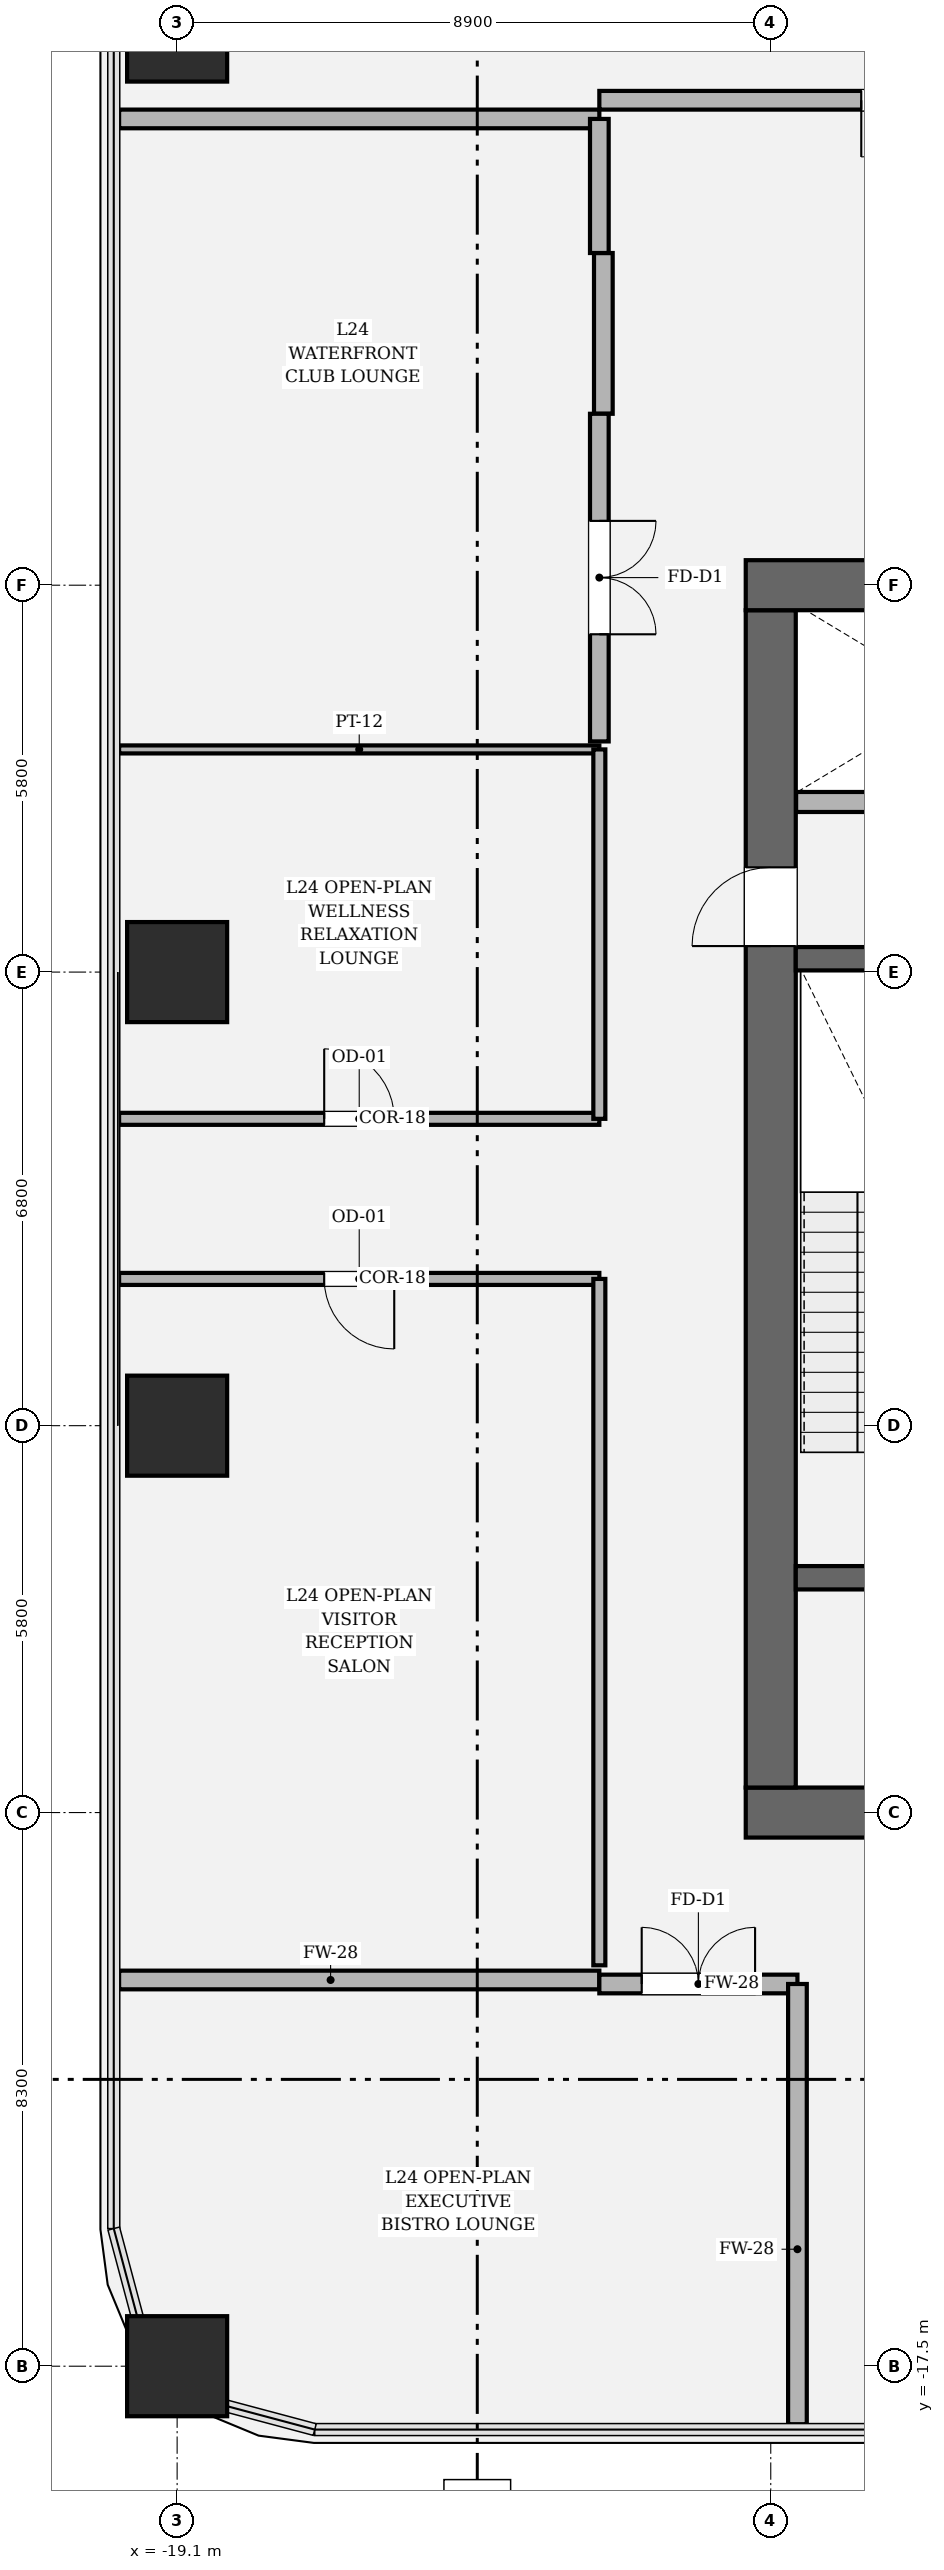
"""IFC4 building model, lengths in metres.
Left out: names, types, materials, properties, quantities, classifications, styles, units other than length and angle.
Written with IfcOpenShell. Run it as: python <this file> out.ifc"""

import sys

from ifc_helpers import new_model, si_unit, direction, frame, frame_2d, origin, origin_2d, place, context, subcontext, project, spatial, rectangle, hollow_rectangle, extrude, element, fill, save


model = new_model("IFC4")
c1 = context("Model", 3, precision=1e-05, world=origin(), true_north=direction((0.0, 1.0)))
c2 = subcontext(c1, "Body", "Model", "MODEL_VIEW")
j1 = project(units=[si_unit("LENGTHUNIT", "METRE"), si_unit("PLANEANGLEUNIT", "RADIAN")], contexts=[c1])
p1 = place(None, origin())
s1 = spatial("IfcSite", under=j1, at=p1, CompositionType="ELEMENT")
p2 = place(p1, origin())
s2 = spatial("IfcBuilding", under=s1, at=p2, CompositionType="ELEMENT")
p3 = place(p2, frame((0.0, 0.0, 105.15)))
s3 = spatial("IfcBuildingStorey", under=s2, at=p3, CompositionType="ELEMENT", Elevation=105.15)
p4 = place(p3, frame((10.575, -9.2, 0.0), z_axis=(0.0, 0.0, 1.0), x_axis=(-1.0, 0.0, 0.0)))
e1 = element("IfcWall", 1, at=p4, inside=s3, PredefinedType="SHEAR", context=c2, shape_type="SweptSolid", body=[
    extrude(rectangle(XDim=21.15, YDim=0.75, at=frame_2d((10.575, 0.0))), origin(), (0.0, 0.0, 1.0), 4.05),
])
p5 = place(p4, frame((2.85, 0.0, 0.0)))
e2 = element("IfcOpeningElement", 2, at=p5, cuts=e1, PredefinedType="OPENING", context=c2, shape_type="SweptSolid", body=[
    extrude(rectangle(XDim=1.25, YDim=2.25, at=frame_2d((0.625, 1.125))), frame((0.0, 0.385, 0.0), z_axis=(0.0, -1.0, 0.0), x_axis=(1.0, 0.0, 0.0)), (0.0, 0.0, 1.0), 0.77),
])
p6 = place(p4, frame((17.05, 0.0, 0.0)))
e3 = element("IfcOpeningElement", 3, at=p6, cuts=e1, PredefinedType="OPENING", context=c2, shape_type="SweptSolid", body=[
    extrude(rectangle(XDim=1.25, YDim=2.25, at=frame_2d((0.625, 1.125))), frame((0.0, 0.385, 0.0), z_axis=(0.0, -1.0, 0.0), x_axis=(1.0, 0.0, 0.0)), (0.0, 0.0, 1.0), 0.77),
])
p7 = place(p3, frame((-10.2, -8.825, 0.0), z_axis=(0.0, 0.0, 1.0), x_axis=(0.0, 1.0, 0.0)))
e4 = element("IfcWall", 4, at=p7, inside=s3, PredefinedType="SHEAR", context=c2, shape_type="SweptSolid", body=[
    extrude(rectangle(XDim=17.65, YDim=0.75, at=frame_2d((8.825, 0.0))), origin(), (0.0, 0.0, 1.0), 4.05),
])
p8 = place(p7, frame((12.615, 0.0, 0.0)))
e5 = element("IfcOpeningElement", 5, at=p8, cuts=e4, PredefinedType="OPENING", context=c2, shape_type="SweptSolid", body=[
    extrude(rectangle(XDim=1.18, YDim=2.2, at=frame_2d((0.59, 1.1))), frame((0.0, 0.385, 0.0), z_axis=(0.0, -1.0, 0.0), x_axis=(1.0, 0.0, 0.0)), (0.0, 0.0, 1.0), 0.77),
])
p9 = place(p3, frame((-10.575, 9.2, 0.0), z_axis=(0.0, 0.0, 1.0), x_axis=(1.0, 0.0, 0.0)))
e6 = element("IfcWall", 6, at=p9, inside=s3, PredefinedType="SHEAR", context=c2, shape_type="SweptSolid", body=[
    extrude(rectangle(XDim=21.15, YDim=0.75, at=frame_2d((10.575, 0.0))), origin(), (0.0, 0.0, 1.0), 4.05),
])
p10 = place(p3, frame((-9.825, -5.68, 0.0), z_axis=(0.0, 0.0, 1.0), x_axis=(1.0, 0.0, 0.0)))
e7 = element("IfcWall", 7, at=p10, inside=s3, PredefinedType="SOLIDWALL", context=c2, shape_type="SweptSolid", body=[
    extrude(rectangle(XDim=5.175, YDim=0.35, at=frame_2d((2.587, 0.0))), origin(), (0.0, 0.0, 1.0), 4.05),
])
p11 = place(p10, frame((1.285, 0.0, 0.0)))
e8 = element("IfcOpeningElement", 8, at=p11, cuts=e7, PredefinedType="OPENING", context=c2, shape_type="SweptSolid", body=[
    extrude(rectangle(XDim=1.18, YDim=2.2, at=frame_2d((0.59, 1.1))), frame((0.0, 0.185, 0.0), z_axis=(0.0, -1.0, 0.0), x_axis=(1.0, 0.0, 0.0)), (0.0, 0.0, 1.0), 0.37),
])
p12 = place(p3, frame((-9.825, 3.6, 0.0), z_axis=(0.0, 0.0, 1.0), x_axis=(1.0, 0.0, 0.0)))
e9 = element("IfcWall", 9, at=p12, inside=s3, PredefinedType="SOLIDWALL", context=c2, shape_type="SweptSolid", body=[
    extrude(rectangle(XDim=5.175, YDim=0.35, at=frame_2d((2.587, 0.0))), origin(), (0.0, 0.0, 1.0), 4.05),
])
for number, where, z_axis, x_axis in (
    (10, (-19.1, -17.5, 0.0), (0.0, 0.0, 1.0), (1.0, 0.0, 0.0)),
    (11, (-19.1, 17.5, 0.0), (0.0, 0.0, 1.0), (1.0, 0.0, 0.0)),
    (12, (-19.1, 3.4, 0.0), (0.0, 0.0, 1.0), (1.0, 0.0, 0.0)),
    (13, (-19.1, -3.4, 0.0), (0.0, 0.0, 1.0), (1.0, 0.0, 0.0)),
):
    element("IfcColumn", number, at=place(p3, frame(where, z_axis=z_axis, x_axis=x_axis)), inside=s3, PredefinedType="COLUMN", context=c2, shape_type="SweptSolid", body=[
        extrude(hollow_rectangle(XDim=1.5, YDim=1.5, WallThickness=0.045, at=origin_2d()), origin(), (0.0, 0.0, 1.0), 4.05),
    ])
p13 = place(p3, frame((-9.82, 5.95, 0.0), z_axis=(0.0, 0.0, 1.0), x_axis=(1.0, 0.0, 0.0)))
e14 = element("IfcWall", 14, at=p13, inside=s3, PredefinedType="SOLIDWALL", context=c2, shape_type="SweptSolid", body=[
    extrude(rectangle(XDim=4.76, YDim=0.3, at=frame_2d((2.38, 0.0))), origin(), (0.0, 0.0, 1.0), 3.81),
])
p14 = place(p3, frame((-19.97, -11.71, 0.0), z_axis=(0.0, 0.0, 1.0), x_axis=(1.0, 0.0, 0.0)))
e15 = element("IfcWall", 15, at=p14, inside=s3, PredefinedType="SOLIDWALL", context=c2, shape_type="SweptSolid", body=[
    extrude(rectangle(XDim=7.2, YDim=0.28, at=frame_2d((3.6, 0.0))), origin(), (0.0, 0.0, 1.0), 2.484),
])
p15 = place(p3, frame((-12.77, -11.77, 0.0), z_axis=(0.0, 0.0, 1.0), x_axis=(1.0, 0.0, 0.0)))
e16 = element("IfcWall", 16, at=p15, inside=s3, PredefinedType="SOLIDWALL", context=c2, shape_type="SweptSolid", body=[
    extrude(rectangle(XDim=2.97, YDim=0.28, at=frame_2d((1.485, 0.0))), origin(), (0.0, 0.0, 1.0), 2.484),
])
p16 = place(p15, frame((0.635, 0.0, 0.0)))
e17 = element("IfcOpeningElement", 17, at=p16, cuts=e16, PredefinedType="OPENING", context=c2, shape_type="SweptSolid", body=[
    extrude(rectangle(XDim=1.7, YDim=2.3, at=frame_2d((0.85, 1.15))), frame((0.0, 0.15, 0.0), z_axis=(0.0, -1.0, 0.0), x_axis=(1.0, 0.0, 0.0)), (0.0, 0.0, 1.0), 0.3),
])
p17 = place(p3, frame((-9.8, -11.77, 0.0), z_axis=(0.0, 0.0, 1.0), x_axis=(0.0, -1.0, 0.0)))
e18 = element("IfcWall", 18, at=p17, inside=s3, PredefinedType="SOLIDWALL", context=c2, shape_type="SweptSolid", body=[
    extrude(rectangle(XDim=6.6, YDim=0.28, at=frame_2d((3.3, 0.0))), origin(), (0.0, 0.0, 1.0), 2.484),
])
p18 = place(p3, frame((-19.97, -1.2, 0.0), z_axis=(0.0, 0.0, 1.0), x_axis=(1.0, 0.0, 0.0)))
e19 = element("IfcWall", 19, at=p18, inside=s3, PredefinedType="PARTITIONING", context=c2, shape_type="SweptSolid", body=[
    extrude(rectangle(XDim=7.2, YDim=0.18, at=frame_2d((3.6, 0.0))), origin(), (0.0, 0.0, 1.0), 2.484),
])
p19 = place(p18, frame((3.075, 0.0, 0.0)))
e20 = element("IfcOpeningElement", 20, at=p19, cuts=e19, PredefinedType="OPENING", context=c2, shape_type="SweptSolid", body=[
    extrude(rectangle(XDim=1.05, YDim=2.2, at=frame_2d((0.525, 1.1))), frame((0.0, 0.1, 0.0), z_axis=(0.0, -1.0, 0.0), x_axis=(1.0, 0.0, 0.0)), (0.0, 0.0, 1.0), 0.2),
])
p20 = place(p3, frame((-12.77, -1.2, 0.0), z_axis=(0.0, 0.0, 1.0), x_axis=(0.0, -1.0, 0.0)))
e21 = element("IfcWall", 21, at=p20, inside=s3, PredefinedType="PARTITIONING", context=c2, shape_type="SweptSolid", body=[
    extrude(rectangle(XDim=10.29, YDim=0.18, at=frame_2d((5.145, 0.0))), origin(), (0.0, 0.0, 1.0), 2.484),
])
p21 = place(p3, frame((-12.77, 1.2, 0.0), z_axis=(0.0, 0.0, 1.0), x_axis=(-1.0, 0.0, 0.0)))
e22 = element("IfcWall", 22, at=p21, inside=s3, PredefinedType="PARTITIONING", context=c2, shape_type="SweptSolid", body=[
    extrude(rectangle(XDim=7.2, YDim=0.18, at=frame_2d((3.6, 0.0))), origin(), (0.0, 0.0, 1.0), 2.484),
])
p22 = place(p21, frame((3.075, 0.0, 0.0)))
e23 = element("IfcOpeningElement", 23, at=p22, cuts=e22, PredefinedType="OPENING", context=c2, shape_type="SweptSolid", body=[
    extrude(rectangle(XDim=1.05, YDim=2.2, at=frame_2d((0.525, 1.1))), frame((0.0, 0.1, 0.0), z_axis=(0.0, -1.0, 0.0), x_axis=(1.0, 0.0, 0.0)), (0.0, 0.0, 1.0), 0.2),
])
p23 = place(p3, frame((-19.97, 6.738, 0.0), z_axis=(0.0, 0.0, 1.0), x_axis=(1.0, 0.0, 0.0)))
e24 = element("IfcWall", 24, at=p23, inside=s3, PredefinedType="PARTITIONING", context=c2, shape_type="SweptSolid", body=[
    extrude(rectangle(XDim=7.2, YDim=0.12, at=frame_2d((3.6, 0.0))), origin(), (0.0, 0.0, 1.0), 2.484),
])
p24 = place(p3, frame((-12.77, 6.738, 0.0), z_axis=(0.0, 0.0, 1.0), x_axis=(0.0, -1.0, 0.0)))
e25 = element("IfcWall", 25, at=p24, inside=s3, PredefinedType="PARTITIONING", context=c2, shape_type="SweptSolid", body=[
    extrude(rectangle(XDim=5.538, YDim=0.18, at=frame_2d((2.769, 0.0))), origin(), (0.0, 0.0, 1.0), 2.484),
])
p25 = place(p3, frame((-12.71, 14.18, 0.0), z_axis=(0.0, 0.0, 1.0), x_axis=(0.0, -1.0, 0.0)))
e26 = element("IfcWall", 26, at=p25, inside=s3, PredefinedType="SOLIDWALL", context=c2, shape_type="SweptSolid", body=[
    extrude(rectangle(XDim=2.41, YDim=0.28, at=frame_2d((1.205, 0.0))), origin(), (0.0, 0.0, 1.0), 3.354),
])
p26 = place(p3, frame((-12.77, 11.77, 0.0), z_axis=(0.0, 0.0, 1.0), x_axis=(0.0, -1.0, 0.0)))
e27 = element("IfcWall", 27, at=p26, inside=s3, PredefinedType="SOLIDWALL", context=c2, shape_type="SweptSolid", body=[
    extrude(rectangle(XDim=4.912, YDim=0.28, at=frame_2d((2.456, 0.0))), origin(), (0.0, 0.0, 1.0), 2.484),
])
p27 = place(p26, frame((1.606, 0.0, 0.0)))
e28 = element("IfcOpeningElement", 28, at=p27, cuts=e27, PredefinedType="OPENING", context=c2, shape_type="SweptSolid", body=[
    extrude(rectangle(XDim=1.7, YDim=2.3, at=frame_2d((0.85, 1.15))), frame((0.0, 0.15, 0.0), z_axis=(0.0, -1.0, 0.0), x_axis=(1.0, 0.0, 0.0)), (0.0, 0.0, 1.0), 0.3),
])
p28 = place(p3, frame((-19.97, 16.19, 0.0), z_axis=(0.0, 0.0, 1.0), x_axis=(1.0, 0.0, 0.0)))
e29 = element("IfcWall", 29, at=p28, inside=s3, PredefinedType="SOLIDWALL", context=c2, shape_type="SweptSolid", body=[
    extrude(rectangle(XDim=7.2, YDim=0.28, at=frame_2d((3.6, 0.0))), origin(), (0.0, 0.0, 1.0), 2.484),
])
p29 = place(p3, frame((-12.77, 16.19, 0.0), z_axis=(0.0, 0.0, 1.0), x_axis=(0.0, -1.0, 0.0)))
e30 = element("IfcWall", 30, at=p29, inside=s3, PredefinedType="SOLIDWALL", context=c2, shape_type="SweptSolid", body=[
    extrude(rectangle(XDim=2.01, YDim=0.28, at=frame_2d((1.005, 0.0))), origin(), (0.0, 0.0, 1.0), 3.81),
])
p30 = place(p3, frame((-3.216, 16.47, 0.0), z_axis=(0.0, 0.0, 1.0), x_axis=(-1.0, 0.0, 0.0)))
e31 = element("IfcWall", 31, at=p30, inside=s3, PredefinedType="SOLIDWALL", context=c2, shape_type="SweptSolid", body=[
    extrude(rectangle(XDim=9.554, YDim=0.28, at=frame_2d((4.777, 0.0))), origin(), (0.0, 0.0, 1.0), 2.484),
])
p31 = place(p30, frame((3.927, 0.0, 0.0)))
e32 = element("IfcOpeningElement", 32, at=p31, cuts=e31, PredefinedType="OPENING", context=c2, shape_type="SweptSolid", body=[
    extrude(rectangle(XDim=1.7, YDim=2.3, at=frame_2d((0.85, 1.15))), frame((0.0, 0.15, 0.0), z_axis=(0.0, -1.0, 0.0), x_axis=(1.0, 0.0, 0.0)), (0.0, 0.0, 1.0), 0.3),
])
p32 = place(p8, origin())
e33 = element("IfcDoor", 33, at=p32, inside=s3, OperationType="SINGLE_SWING_LEFT", PredefinedType="DOOR", context=c2, shape_type="SweptSolid", body=[
    extrude(rectangle(XDim=1.18, YDim=2.2, at=frame_2d((0.59, 1.1))), frame((0.0, 0.025, 0.0), z_axis=(0.0, -1.0, 0.0), x_axis=(1.0, 0.0, 0.0)), (0.0, 0.0, 1.0), 0.05),
])
fill(e5, e33)
p33 = place(p16, origin())
e34 = element("IfcDoor", 34, at=p33, inside=s3, OperationType="DOUBLE_DOOR_SINGLE_SWING", PredefinedType="DOOR", context=c2, shape_type="SweptSolid", body=[
    extrude(rectangle(XDim=1.7, YDim=2.3, at=frame_2d((0.85, 1.15))), frame((0.0, 0.025, 0.0), z_axis=(0.0, -1.0, 0.0), x_axis=(1.0, 0.0, 0.0)), (0.0, 0.0, 1.0), 0.05),
])
fill(e17, e34)
p34 = place(p19, origin())
e35 = element("IfcDoor", 35, at=p34, inside=s3, OperationType="SINGLE_SWING_RIGHT", PredefinedType="DOOR", context=c2, shape_type="SweptSolid", body=[
    extrude(rectangle(XDim=1.05, YDim=2.2, at=frame_2d((0.525, 1.1))), frame((0.0, 0.025, 0.0), z_axis=(0.0, -1.0, 0.0), x_axis=(1.0, 0.0, 0.0)), (0.0, 0.0, 1.0), 0.05),
])
fill(e20, e35)
p35 = place(p22, origin())
e36 = element("IfcDoor", 36, at=p35, inside=s3, OperationType="SINGLE_SWING_RIGHT", PredefinedType="DOOR", context=c2, shape_type="SweptSolid", body=[
    extrude(rectangle(XDim=1.05, YDim=2.2, at=frame_2d((0.525, 1.1))), frame((0.0, 0.025, 0.0), z_axis=(0.0, -1.0, 0.0), x_axis=(1.0, 0.0, 0.0)), (0.0, 0.0, 1.0), 0.05),
])
fill(e23, e36)
p36 = place(p27, origin())
e37 = element("IfcDoor", 37, at=p36, inside=s3, OperationType="DOUBLE_DOOR_SINGLE_SWING", PredefinedType="DOOR", context=c2, shape_type="SweptSolid", body=[
    extrude(rectangle(XDim=1.7, YDim=2.3, at=frame_2d((0.85, 1.15))), frame((0.0, 0.025, 0.0), z_axis=(0.0, -1.0, 0.0), x_axis=(1.0, 0.0, 0.0)), (0.0, 0.0, 1.0), 0.05),
])
fill(e28, e37)
p37 = place(p31, origin())
e38 = element("IfcDoor", 38, at=p37, inside=s3, OperationType="DOUBLE_DOOR_SINGLE_SWING", PredefinedType="DOOR", context=c2, shape_type="SweptSolid", body=[
    extrude(rectangle(XDim=1.7, YDim=2.3, at=frame_2d((0.85, 1.15))), frame((0.0, 0.025, 0.0), z_axis=(0.0, -1.0, 0.0), x_axis=(1.0, 0.0, 0.0)), (0.0, 0.0, 1.0), 0.05),
])
fill(e32, e38)
save(model, sys.argv[1])
